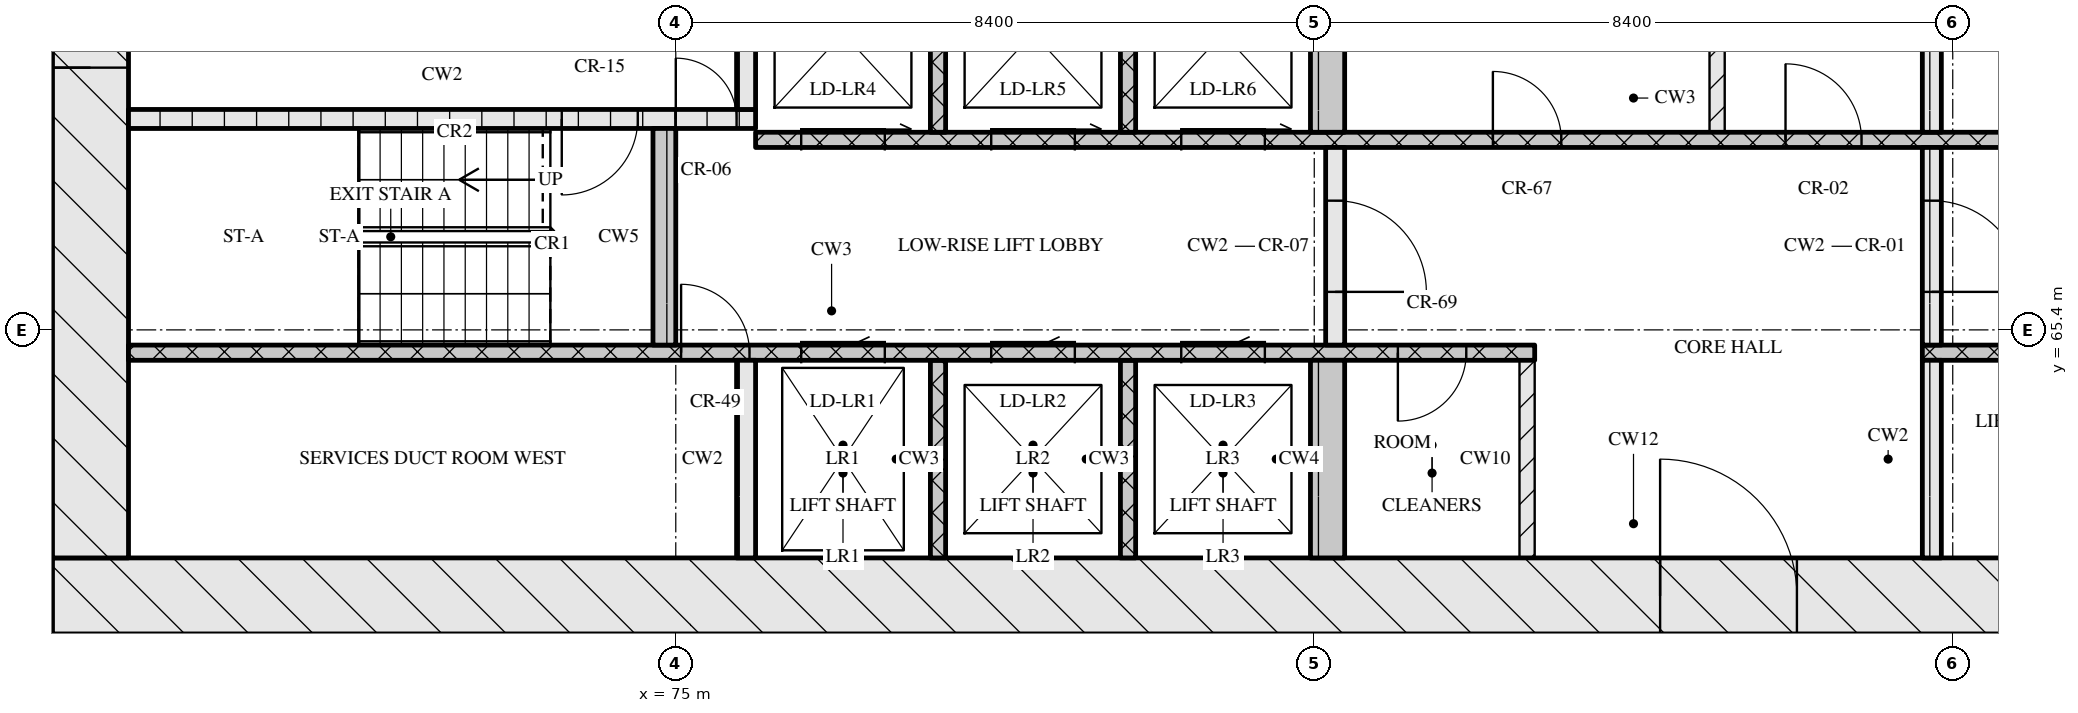
"""IFC4 building model, lengths in metres.
Left out: names, types, materials, properties, quantities, classifications, styles, units other than length and angle.
Written with IfcOpenShell. Run it as: python <this file> out.ifc"""

import sys

from ifc_helpers import new_model, si_unit, direction, frame, frame_2d, origin, place, context, subcontext, project, spatial, rectangle, extrude, element, fill, save


model = new_model("IFC4")
c1 = context("Model", 3, precision=1e-05, world=origin(), true_north=direction((0.0, 1.0)))
c2 = subcontext(c1, "Body", "Model", "MODEL_VIEW")
j1 = project(units=[si_unit("LENGTHUNIT", "METRE"), si_unit("PLANEANGLEUNIT", "RADIAN")], contexts=[c1])
p1 = place(None, origin())
s1 = spatial("IfcSite", under=j1, at=p1, CompositionType="ELEMENT")
p2 = place(p1, origin())
s2 = spatial("IfcBuilding", under=s1, at=p2, CompositionType="ELEMENT")
p3 = place(p2, frame((0.0, 0.0, 106.05)))
s3 = spatial("IfcBuildingStorey", under=s2, at=p3, CompositionType="ELEMENT", Elevation=106.05)
p4 = place(p3, frame((66.8, 61.9, 0.0), z_axis=(0.0, 0.0, 1.0), x_axis=(1.0, 0.0, 0.0)))
e1 = element("IfcWall", 1, at=p4, inside=s3, PredefinedType="SOLIDWALL", context=c2, shape_type="SweptSolid", body=[
    extrude(rectangle(XDim=41.6, YDim=1.0, at=frame_2d((20.8, 0.0))), origin(), (0.0, 0.0, 1.0), 3.32),
])
p5 = place(p4, frame((21.15, 0.0, 0.0)))
e2 = element("IfcOpeningElement", 2, at=p5, cuts=e1, PredefinedType="OPENING", context=c2, shape_type="SweptSolid", body=[
    extrude(rectangle(XDim=1.8, YDim=2.1, at=frame_2d((0.9, 1.05))), frame((0.0, 0.51, 0.0), z_axis=(0.0, -1.0, 0.0), x_axis=(1.0, 0.0, 0.0)), (0.0, 0.0, 1.0), 1.02),
])
p6 = place(p3, frame((67.3, 62.4, 0.0), z_axis=(0.0, 0.0, 1.0), x_axis=(0.0, 1.0, 0.0)))
e3 = element("IfcWall", 3, at=p6, inside=s3, PredefinedType="SOLIDWALL", context=c2, shape_type="SweptSolid", body=[
    extrude(rectangle(XDim=12.0, YDim=1.0, at=frame_2d((6.0, 0.0))), origin(), (0.0, 0.0, 1.0), 3.32),
])
p7 = place(p6, frame((6.45, 0.0, 0.0)))
e4 = element("IfcOpeningElement", 4, at=p7, cuts=e3, PredefinedType="OPENING", context=c2, shape_type="SweptSolid", body=[
    extrude(rectangle(XDim=1.2, YDim=2.1, at=frame_2d((0.6, 1.05))), frame((0.0, 0.51, 0.0), z_axis=(0.0, -1.0, 0.0), x_axis=(1.0, 0.0, 0.0)), (0.0, 0.0, 1.0), 1.02),
])
p8 = place(p3, frame((75.925, 62.4, 0.0), z_axis=(0.0, 0.0, 1.0), x_axis=(0.0, 1.0, 0.0)))
e5 = element("IfcWall", 5, at=p8, inside=s3, PredefinedType="SOLIDWALL", context=c2, shape_type="SweptSolid", body=[
    extrude(rectangle(XDim=2.6, YDim=0.25, at=frame_2d((1.3, 0.0))), origin(), (0.0, 0.0, 1.0), 3.32),
])
for number, where, z_axis, x_axis in (
    (6, (78.45, 62.4, 0.0), (0.0, 0.0, 1.0), (0.0, 1.0, 0.0)),
    (7, (80.95, 62.4, 0.0), (0.0, 0.0, 1.0), (0.0, 1.0, 0.0)),
):
    element("IfcWall", number, at=place(p3, frame(where, z_axis=z_axis, x_axis=x_axis)), inside=s3, PredefinedType="SOLIDWALL", context=c2, shape_type="SweptSolid", body=[
        extrude(rectangle(XDim=2.6, YDim=0.2, at=frame_2d((1.3, 0.0))), origin(), (0.0, 0.0, 1.0), 3.32),
    ])
p9 = place(p3, frame((83.575, 62.4, 0.0), z_axis=(0.0, 0.0, 1.0), x_axis=(0.0, 1.0, 0.0)))
e8 = element("IfcWall", 8, at=p9, inside=s3, PredefinedType="SOLIDWALL", context=c2, shape_type="SweptSolid", body=[
    extrude(rectangle(XDim=2.6, YDim=0.45, at=frame_2d((1.3, 0.0))), origin(), (0.0, 0.0, 1.0), 3.32),
])
p10 = place(p3, frame((86.2, 62.4, 0.0), z_axis=(0.0, 0.0, 1.0), x_axis=(0.0, 1.0, 0.0)))
e9 = element("IfcWall", 9, at=p10, inside=s3, PredefinedType="PARTITIONING", context=c2, shape_type="SweptSolid", body=[
    extrude(rectangle(XDim=2.6, YDim=0.2, at=frame_2d((1.3, 0.0))), origin(), (0.0, 0.0, 1.0), 3.32),
])
p11 = place(p3, frame((91.525, 62.4, 0.0), z_axis=(0.0, 0.0, 1.0), x_axis=(0.0, 1.0, 0.0)))
e10 = element("IfcWall", 10, at=p11, inside=s3, PredefinedType="SOLIDWALL", context=c2, shape_type="SweptSolid", body=[
    extrude(rectangle(XDim=2.6, YDim=0.25, at=frame_2d((1.3, 0.0))), origin(), (0.0, 0.0, 1.0), 3.32),
])
p12 = place(p3, frame((67.8, 65.1, 0.0), z_axis=(0.0, 0.0, 1.0), x_axis=(1.0, 0.0, 0.0)))
e11 = element("IfcWall", 11, at=p12, inside=s3, PredefinedType="SOLIDWALL", context=c2, shape_type="SweptSolid", body=[
    extrude(rectangle(XDim=18.5, YDim=0.2, at=frame_2d((9.25, 0.0))), origin(), (0.0, 0.0, 1.0), 3.32),
])
p13 = place(p12, frame((7.27, 0.0, 0.0)))
e12 = element("IfcOpeningElement", 12, at=p13, cuts=e11, PredefinedType="OPENING", context=c2, shape_type="SweptSolid", body=[
    extrude(rectangle(XDim=0.9, YDim=2.1, at=frame_2d((0.45, 1.05))), frame((0.0, 0.11, 0.0), z_axis=(0.0, -1.0, 0.0), x_axis=(1.0, 0.0, 0.0)), (0.0, 0.0, 1.0), 0.22),
])
p14 = place(p12, frame((8.85, 0.0, 0.0)))
e13 = element("IfcOpeningElement", 13, at=p14, cuts=e11, PredefinedType="OPENING", context=c2, shape_type="SweptSolid", body=[
    extrude(rectangle(XDim=1.1, YDim=2.1, at=frame_2d((0.55, 1.05))), frame((0.0, 0.11, 0.0), z_axis=(0.0, -1.0, 0.0), x_axis=(1.0, 0.0, 0.0)), (0.0, 0.0, 1.0), 0.22),
])
p15 = place(p12, frame((11.35, 0.0, 0.0)))
e14 = element("IfcOpeningElement", 14, at=p15, cuts=e11, PredefinedType="OPENING", context=c2, shape_type="SweptSolid", body=[
    extrude(rectangle(XDim=1.1, YDim=2.1, at=frame_2d((0.55, 1.05))), frame((0.0, 0.11, 0.0), z_axis=(0.0, -1.0, 0.0), x_axis=(1.0, 0.0, 0.0)), (0.0, 0.0, 1.0), 0.22),
])
p16 = place(p12, frame((13.85, 0.0, 0.0)))
e15 = element("IfcOpeningElement", 15, at=p16, cuts=e11, PredefinedType="OPENING", context=c2, shape_type="SweptSolid", body=[
    extrude(rectangle(XDim=1.1, YDim=2.1, at=frame_2d((0.55, 1.05))), frame((0.0, 0.11, 0.0), z_axis=(0.0, -1.0, 0.0), x_axis=(1.0, 0.0, 0.0)), (0.0, 0.0, 1.0), 0.22),
])
p17 = place(p12, frame((16.7, 0.0, 0.0)))
e16 = element("IfcOpeningElement", 16, at=p17, cuts=e11, PredefinedType="OPENING", context=c2, shape_type="SweptSolid", body=[
    extrude(rectangle(XDim=0.9, YDim=2.1, at=frame_2d((0.45, 1.05))), frame((0.0, 0.11, 0.0), z_axis=(0.0, -1.0, 0.0), x_axis=(1.0, 0.0, 0.0)), (0.0, 0.0, 1.0), 0.22),
])
p18 = place(p3, frame((91.4, 65.1, 0.0), z_axis=(0.0, 0.0, 1.0), x_axis=(1.0, 0.0, 0.0)))
e17 = element("IfcWall", 17, at=p18, inside=s3, PredefinedType="SOLIDWALL", context=c2, shape_type="SweptSolid", body=[
    extrude(rectangle(XDim=16.0, YDim=0.2, at=frame_2d((8.0, 0.0))), origin(), (0.0, 0.0, 1.0), 3.32),
])
p19 = place(p18, frame((7.83, 0.0, 0.0)))
e18 = element("IfcOpeningElement", 18, at=p19, cuts=e17, PredefinedType="OPENING", context=c2, shape_type="SweptSolid", body=[
    extrude(rectangle(XDim=0.9, YDim=2.1, at=frame_2d((0.45, 1.05))), frame((0.0, 0.11, 0.0), z_axis=(0.0, -1.0, 0.0), x_axis=(1.0, 0.0, 0.0)), (0.0, 0.0, 1.0), 0.22),
])
p20 = place(p3, frame((74.85, 65.2, 0.0), z_axis=(0.0, 0.0, 1.0), x_axis=(0.0, 1.0, 0.0)))
e19 = element("IfcWall", 19, at=p20, inside=s3, PredefinedType="SOLIDWALL", context=c2, shape_type="SweptSolid", body=[
    extrude(rectangle(XDim=2.85, YDim=0.3, at=frame_2d((1.425, 0.0))), origin(), (0.0, 0.0, 1.0), 3.32),
])
p21 = place(p3, frame((83.675, 65.2, 0.0), z_axis=(0.0, 0.0, 1.0), x_axis=(0.0, 1.0, 0.0)))
e20 = element("IfcWall", 20, at=p21, inside=s3, PredefinedType="SOLIDWALL", context=c2, shape_type="SweptSolid", body=[
    extrude(rectangle(XDim=2.6, YDim=0.25, at=frame_2d((1.3, 0.0))), origin(), (0.0, 0.0, 1.0), 3.32),
])
p22 = place(p21, frame((0.7, 0.0, 0.0)))
e21 = element("IfcOpeningElement", 21, at=p22, cuts=e20, PredefinedType="OPENING", context=c2, shape_type="SweptSolid", body=[
    extrude(rectangle(XDim=1.2, YDim=2.1, at=frame_2d((0.6, 1.05))), frame((0.0, 0.135, 0.0), z_axis=(0.0, -1.0, 0.0), x_axis=(1.0, 0.0, 0.0)), (0.0, 0.0, 1.0), 0.27),
])
p23 = place(p3, frame((91.525, 65.2, 0.0), z_axis=(0.0, 0.0, 1.0), x_axis=(0.0, 1.0, 0.0)))
e22 = element("IfcWall", 22, at=p23, inside=s3, PredefinedType="SOLIDWALL", context=c2, shape_type="SweptSolid", body=[
    extrude(rectangle(XDim=2.6, YDim=0.25, at=frame_2d((1.3, 0.0))), origin(), (0.0, 0.0, 1.0), 3.32),
])
p24 = place(p23, frame((0.7, 0.0, 0.0)))
e23 = element("IfcOpeningElement", 23, at=p24, cuts=e22, PredefinedType="OPENING", context=c2, shape_type="SweptSolid", body=[
    extrude(rectangle(XDim=1.2, YDim=2.1, at=frame_2d((0.6, 1.05))), frame((0.0, 0.135, 0.0), z_axis=(0.0, -1.0, 0.0), x_axis=(1.0, 0.0, 0.0)), (0.0, 0.0, 1.0), 0.27),
])
p25 = place(p3, frame((76.05, 67.9, 0.0), z_axis=(0.0, 0.0, 1.0), x_axis=(1.0, 0.0, 0.0)))
e24 = element("IfcWall", 24, at=p25, inside=s3, PredefinedType="SOLIDWALL", context=c2, shape_type="SweptSolid", body=[
    extrude(rectangle(XDim=23.1, YDim=0.2, at=frame_2d((11.55, 0.0))), origin(), (0.0, 0.0, 1.0), 3.32),
])
p26 = place(p25, frame((0.6, 0.0, 0.0)))
e25 = element("IfcOpeningElement", 25, at=p26, cuts=e24, PredefinedType="OPENING", context=c2, shape_type="SweptSolid", body=[
    extrude(rectangle(XDim=1.1, YDim=2.1, at=frame_2d((0.55, 1.05))), frame((0.0, 0.11, 0.0), z_axis=(0.0, -1.0, 0.0), x_axis=(1.0, 0.0, 0.0)), (0.0, 0.0, 1.0), 0.22),
])
p27 = place(p25, frame((3.1, 0.0, 0.0)))
e26 = element("IfcOpeningElement", 26, at=p27, cuts=e24, PredefinedType="OPENING", context=c2, shape_type="SweptSolid", body=[
    extrude(rectangle(XDim=1.1, YDim=2.1, at=frame_2d((0.55, 1.05))), frame((0.0, 0.11, 0.0), z_axis=(0.0, -1.0, 0.0), x_axis=(1.0, 0.0, 0.0)), (0.0, 0.0, 1.0), 0.22),
])
p28 = place(p25, frame((5.6, 0.0, 0.0)))
e27 = element("IfcOpeningElement", 27, at=p28, cuts=e24, PredefinedType="OPENING", context=c2, shape_type="SweptSolid", body=[
    extrude(rectangle(XDim=1.1, YDim=2.1, at=frame_2d((0.55, 1.05))), frame((0.0, 0.11, 0.0), z_axis=(0.0, -1.0, 0.0), x_axis=(1.0, 0.0, 0.0)), (0.0, 0.0, 1.0), 0.22),
])
p29 = place(p25, frame((9.7, 0.0, 0.0)))
e28 = element("IfcOpeningElement", 28, at=p29, cuts=e24, PredefinedType="OPENING", context=c2, shape_type="SweptSolid", body=[
    extrude(rectangle(XDim=0.9, YDim=2.1, at=frame_2d((0.45, 1.05))), frame((0.0, 0.11, 0.0), z_axis=(0.0, -1.0, 0.0), x_axis=(1.0, 0.0, 0.0)), (0.0, 0.0, 1.0), 0.22),
])
p30 = place(p25, frame((13.55, 0.0, 0.0)))
e29 = element("IfcOpeningElement", 29, at=p30, cuts=e24, PredefinedType="OPENING", context=c2, shape_type="SweptSolid", body=[
    extrude(rectangle(XDim=1.0, YDim=2.1, at=frame_2d((0.5, 1.05))), frame((0.0, 0.11, 0.0), z_axis=(0.0, -1.0, 0.0), x_axis=(1.0, 0.0, 0.0)), (0.0, 0.0, 1.0), 0.22),
])
for number, where, z_axis, x_axis in (
    (30, (78.45, 68.0, 0.0), (0.0, 0.0, 1.0), (0.0, 1.0, 0.0)),
    (31, (80.95, 68.0, 0.0), (0.0, 0.0, 1.0), (0.0, 1.0, 0.0)),
):
    element("IfcWall", number, at=place(p3, frame(where, z_axis=z_axis, x_axis=x_axis)), inside=s3, PredefinedType="SOLIDWALL", context=c2, shape_type="SweptSolid", body=[
        extrude(rectangle(XDim=2.6, YDim=0.2, at=frame_2d((1.3, 0.0))), origin(), (0.0, 0.0, 1.0), 3.32),
    ])
p31 = place(p3, frame((83.575, 68.0, 0.0), z_axis=(0.0, 0.0, 1.0), x_axis=(0.0, 1.0, 0.0)))
e32 = element("IfcWall", 32, at=p31, inside=s3, PredefinedType="SOLIDWALL", context=c2, shape_type="SweptSolid", body=[
    extrude(rectangle(XDim=2.6, YDim=0.45, at=frame_2d((1.3, 0.0))), origin(), (0.0, 0.0, 1.0), 3.32),
])
p32 = place(p3, frame((88.7, 68.0, 0.0), z_axis=(0.0, 0.0, 1.0), x_axis=(0.0, 1.0, 0.0)))
e33 = element("IfcWall", 33, at=p32, inside=s3, PredefinedType="PARTITIONING", context=c2, shape_type="SweptSolid", body=[
    extrude(rectangle(XDim=2.6, YDim=0.2, at=frame_2d((1.3, 0.0))), origin(), (0.0, 0.0, 1.0), 3.32),
])
p33 = place(p3, frame((91.525, 68.0, 0.0), z_axis=(0.0, 0.0, 1.0), x_axis=(0.0, 1.0, 0.0)))
e34 = element("IfcWall", 34, at=p33, inside=s3, PredefinedType="SOLIDWALL", context=c2, shape_type="SweptSolid", body=[
    extrude(rectangle(XDim=2.6, YDim=0.25, at=frame_2d((1.3, 0.0))), origin(), (0.0, 0.0, 1.0), 3.32),
])
p34 = place(p3, frame((67.8, 68.175, 0.0), z_axis=(0.0, 0.0, 1.0), x_axis=(1.0, 0.0, 0.0)))
e35 = element("IfcWall", 35, at=p34, inside=s3, PredefinedType="SOLIDWALL", context=c2, shape_type="SweptSolid", body=[
    extrude(rectangle(XDim=8.25, YDim=0.25, at=frame_2d((4.125, 0.0))), origin(), (0.0, 0.0, 1.0), 3.32),
])
p35 = place(p34, frame((5.7, 0.0, 0.0)))
e36 = element("IfcOpeningElement", 36, at=p35, cuts=e35, PredefinedType="OPENING", context=c2, shape_type="SweptSolid", body=[
    extrude(rectangle(XDim=1.0, YDim=2.1, at=frame_2d((0.5, 1.05))), frame((0.0, 0.135, 0.0), z_axis=(0.0, -1.0, 0.0), x_axis=(1.0, 0.0, 0.0)), (0.0, 0.0, 1.0), 0.27),
])
p36 = place(p34, frame((7.2, 0.0, 0.0)))
e37 = element("IfcOpeningElement", 37, at=p36, cuts=e35, PredefinedType="OPENING", context=c2, shape_type="SweptSolid", body=[
    extrude(rectangle(XDim=0.8, YDim=2.1, at=frame_2d((0.4, 1.05))), frame((0.0, 0.135, 0.0), z_axis=(0.0, -1.0, 0.0), x_axis=(1.0, 0.0, 0.0)), (0.0, 0.0, 1.0), 0.27),
])
p37 = place(p3, frame((75.925, 68.3, 0.0), z_axis=(0.0, 0.0, 1.0), x_axis=(0.0, 1.0, 0.0)))
e38 = element("IfcWall", 38, at=p37, inside=s3, PredefinedType="SOLIDWALL", context=c2, shape_type="SweptSolid", body=[
    extrude(rectangle(XDim=2.3, YDim=0.25, at=frame_2d((1.15, 0.0))), origin(), (0.0, 0.0, 1.0), 3.32),
])
p38 = place(p5, origin())
e39 = element("IfcDoor", 39, at=p38, inside=s3, OperationType="DOUBLE_DOOR_SINGLE_SWING", PredefinedType="DOOR", context=c2, shape_type="SweptSolid", body=[
    extrude(rectangle(XDim=1.8, YDim=2.1, at=frame_2d((0.9, 1.05))), frame((0.0, 0.025, 0.0), z_axis=(0.0, -1.0, 0.0), x_axis=(1.0, 0.0, 0.0)), (0.0, 0.0, 1.0), 0.05),
])
fill(e2, e39)
p39 = place(p13, origin())
e40 = element("IfcDoor", 40, at=p39, inside=s3, OperationType="SINGLE_SWING_LEFT", PredefinedType="DOOR", context=c2, shape_type="SweptSolid", body=[
    extrude(rectangle(XDim=0.9, YDim=2.1, at=frame_2d((0.45, 1.05))), frame((0.0, 0.025, 0.0), z_axis=(0.0, -1.0, 0.0), x_axis=(1.0, 0.0, 0.0)), (0.0, 0.0, 1.0), 0.05),
])
fill(e12, e40)
p40 = place(p14, origin())
e41 = element("IfcDoor", 41, at=p40, inside=s3, OperationType="SLIDING_TO_LEFT", PredefinedType="DOOR", context=c2, shape_type="SweptSolid", body=[
    extrude(rectangle(XDim=1.1, YDim=2.1, at=frame_2d((0.55, 1.05))), frame((0.0, 0.025, 0.0), z_axis=(0.0, -1.0, 0.0), x_axis=(1.0, 0.0, 0.0)), (0.0, 0.0, 1.0), 0.05),
])
fill(e13, e41)
p41 = place(p15, origin())
e42 = element("IfcDoor", 42, at=p41, inside=s3, OperationType="SLIDING_TO_LEFT", PredefinedType="DOOR", context=c2, shape_type="SweptSolid", body=[
    extrude(rectangle(XDim=1.1, YDim=2.1, at=frame_2d((0.55, 1.05))), frame((0.0, 0.025, 0.0), z_axis=(0.0, -1.0, 0.0), x_axis=(1.0, 0.0, 0.0)), (0.0, 0.0, 1.0), 0.05),
])
fill(e14, e42)
p42 = place(p16, origin())
e43 = element("IfcDoor", 43, at=p42, inside=s3, OperationType="SLIDING_TO_LEFT", PredefinedType="DOOR", context=c2, shape_type="SweptSolid", body=[
    extrude(rectangle(XDim=1.1, YDim=2.1, at=frame_2d((0.55, 1.05))), frame((0.0, 0.025, 0.0), z_axis=(0.0, -1.0, 0.0), x_axis=(1.0, 0.0, 0.0)), (0.0, 0.0, 1.0), 0.05),
])
fill(e15, e43)
p43 = place(p17, origin())
e44 = element("IfcDoor", 44, at=p43, inside=s3, OperationType="SINGLE_SWING_RIGHT", PredefinedType="DOOR", context=c2, shape_type="SweptSolid", body=[
    extrude(rectangle(XDim=0.9, YDim=2.1, at=frame_2d((0.45, 1.05))), frame((0.0, 0.025, 0.0), z_axis=(0.0, -1.0, 0.0), x_axis=(1.0, 0.0, 0.0)), (0.0, 0.0, 1.0), 0.05),
])
fill(e16, e44)
p44 = place(p22, origin())
e45 = element("IfcDoor", 45, at=p44, inside=s3, OperationType="SINGLE_SWING_RIGHT", PredefinedType="DOOR", context=c2, shape_type="SweptSolid", body=[
    extrude(rectangle(XDim=1.2, YDim=2.1, at=frame_2d((0.6, 1.05))), frame((0.0, 0.025, 0.0), z_axis=(0.0, -1.0, 0.0), x_axis=(1.0, 0.0, 0.0)), (0.0, 0.0, 1.0), 0.05),
])
fill(e21, e45)
p45 = place(p24, origin())
e46 = element("IfcDoor", 46, at=p45, inside=s3, OperationType="SINGLE_SWING_RIGHT", PredefinedType="DOOR", context=c2, shape_type="SweptSolid", body=[
    extrude(rectangle(XDim=1.2, YDim=2.1, at=frame_2d((0.6, 1.05))), frame((0.0, 0.025, 0.0), z_axis=(0.0, -1.0, 0.0), x_axis=(1.0, 0.0, 0.0)), (0.0, 0.0, 1.0), 0.05),
])
fill(e23, e46)
p46 = place(p26, origin())
e47 = element("IfcDoor", 47, at=p46, inside=s3, OperationType="SLIDING_TO_RIGHT", PredefinedType="DOOR", context=c2, shape_type="SweptSolid", body=[
    extrude(rectangle(XDim=1.1, YDim=2.1, at=frame_2d((0.55, 1.05))), frame((0.0, 0.025, 0.0), z_axis=(0.0, -1.0, 0.0), x_axis=(1.0, 0.0, 0.0)), (0.0, 0.0, 1.0), 0.05),
])
fill(e25, e47)
p47 = place(p27, origin())
e48 = element("IfcDoor", 48, at=p47, inside=s3, OperationType="SLIDING_TO_RIGHT", PredefinedType="DOOR", context=c2, shape_type="SweptSolid", body=[
    extrude(rectangle(XDim=1.1, YDim=2.1, at=frame_2d((0.55, 1.05))), frame((0.0, 0.025, 0.0), z_axis=(0.0, -1.0, 0.0), x_axis=(1.0, 0.0, 0.0)), (0.0, 0.0, 1.0), 0.05),
])
fill(e26, e48)
p48 = place(p28, origin())
e49 = element("IfcDoor", 49, at=p48, inside=s3, OperationType="SLIDING_TO_RIGHT", PredefinedType="DOOR", context=c2, shape_type="SweptSolid", body=[
    extrude(rectangle(XDim=1.1, YDim=2.1, at=frame_2d((0.55, 1.05))), frame((0.0, 0.025, 0.0), z_axis=(0.0, -1.0, 0.0), x_axis=(1.0, 0.0, 0.0)), (0.0, 0.0, 1.0), 0.05),
])
fill(e27, e49)
p49 = place(p29, origin())
e50 = element("IfcDoor", 50, at=p49, inside=s3, OperationType="SINGLE_SWING_LEFT", PredefinedType="DOOR", context=c2, shape_type="SweptSolid", body=[
    extrude(rectangle(XDim=0.9, YDim=2.1, at=frame_2d((0.45, 1.05))), frame((0.0, 0.025, 0.0), z_axis=(0.0, -1.0, 0.0), x_axis=(1.0, 0.0, 0.0)), (0.0, 0.0, 1.0), 0.05),
])
fill(e28, e50)
p50 = place(p30, origin())
e51 = element("IfcDoor", 51, at=p50, inside=s3, OperationType="SINGLE_SWING_LEFT", PredefinedType="DOOR", context=c2, shape_type="SweptSolid", body=[
    extrude(rectangle(XDim=1.0, YDim=2.1, at=frame_2d((0.5, 1.05))), frame((0.0, 0.025, 0.0), z_axis=(0.0, -1.0, 0.0), x_axis=(1.0, 0.0, 0.0)), (0.0, 0.0, 1.0), 0.05),
])
fill(e29, e51)
p51 = place(p35, origin())
e52 = element("IfcDoor", 52, at=p51, inside=s3, OperationType="SINGLE_SWING_RIGHT", PredefinedType="DOOR", context=c2, shape_type="SweptSolid", body=[
    extrude(rectangle(XDim=1.0, YDim=2.1, at=frame_2d((0.5, 1.05))), frame((0.0, 0.025, 0.0), z_axis=(0.0, -1.0, 0.0), x_axis=(1.0, 0.0, 0.0)), (0.0, 0.0, 1.0), 0.05),
])
fill(e36, e52)
p52 = place(p36, origin())
e53 = element("IfcDoor", 53, at=p52, inside=s3, OperationType="SINGLE_SWING_LEFT", PredefinedType="DOOR", context=c2, shape_type="SweptSolid", body=[
    extrude(rectangle(XDim=0.8, YDim=2.1, at=frame_2d((0.4, 1.05))), frame((0.0, 0.025, 0.0), z_axis=(0.0, -1.0, 0.0), x_axis=(1.0, 0.0, 0.0)), (0.0, 0.0, 1.0), 0.05),
])
fill(e37, e53)
p53 = place(p7, origin())
e54 = element("IfcDoor", 54, at=p53, inside=s3, OperationType="SINGLE_SWING_LEFT", PredefinedType="DOOR", context=c2, shape_type="SweptSolid", body=[
    extrude(rectangle(XDim=1.2, YDim=2.1, at=frame_2d((0.6, 1.05))), frame((0.0, 0.025, 0.0), z_axis=(0.0, -1.0, 0.0), x_axis=(1.0, 0.0, 0.0)), (0.0, 0.0, 1.0), 0.05),
])
fill(e4, e54)
save(model, sys.argv[1])
